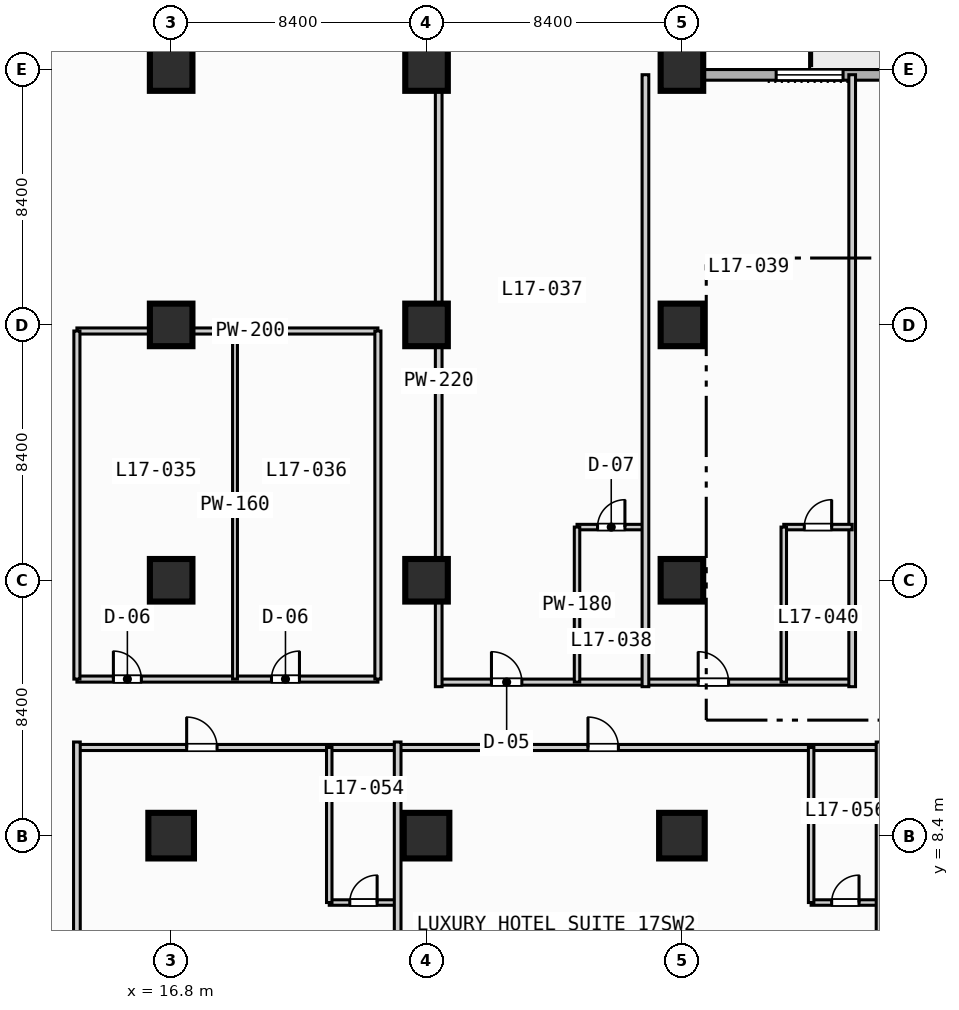
"""IFC4 building model, lengths in metres.
Left out: names, types, materials, properties, quantities, classifications, styles, units other than length and angle.
Written with IfcOpenShell. Run it as: python <this file> out.ifc"""

import sys

from ifc_helpers import new_model, si_unit, direction, frame, frame_2d, origin, origin_2d, place, context, subcontext, project, spatial, rectangle, extrude, element, fill, save


model = new_model("IFC4")
c1 = context("Model", 3, precision=1e-05, world=origin(), true_north=direction((0.0, 1.0)))
c2 = subcontext(c1, "Body", "Model", "MODEL_VIEW")
j1 = project(units=[si_unit("LENGTHUNIT", "METRE"), si_unit("PLANEANGLEUNIT", "RADIAN")], contexts=[c1])
p1 = place(None, origin())
s1 = spatial("IfcSite", under=j1, at=p1, CompositionType="ELEMENT")
p2 = place(p1, origin())
s2 = spatial("IfcBuilding", under=s1, at=p2, CompositionType="ELEMENT")
p3 = place(p2, frame((0.0, 0.0, 73.8)))
s3 = spatial("IfcBuildingStorey", under=s2, at=p3, CompositionType="ELEMENT", Elevation=73.8)
p4 = place(p3, frame((16.8, 8.4, 0.0), z_axis=(0.0, 0.0, 1.0), x_axis=(1.0, 0.0, 0.0)))
e1 = element("IfcColumn", 1, at=p4, inside=s3, PredefinedType="COLUMN", context=c2, shape_type="SweptSolid", body=[
    extrude(rectangle(XDim=1.5, YDim=1.5, at=origin_2d()), origin(), (0.0, 0.0, 1.0), 3.8),
])
for number, where, z_axis, x_axis in (
    (2, (16.8, 16.8, 0.0), (0.0, 0.0, 1.0), (1.0, 0.0, 0.0)),
    (3, (16.8, 25.2, 0.0), (0.0, 0.0, 1.0), (1.0, 0.0, 0.0)),
    (4, (16.8, 33.6, 0.0), (0.0, 0.0, 1.0), (1.0, 0.0, 0.0)),
):
    element("IfcColumn", number, at=place(p3, frame(where, z_axis=z_axis, x_axis=x_axis)), inside=s3, PredefinedType="COLUMN", context=c2, shape_type="SweptSolid", body=[
        extrude(rectangle(XDim=1.4, YDim=1.4, at=origin_2d()), origin(), (0.0, 0.0, 1.0), 3.8),
    ])
p5 = place(p3, frame((25.2, 8.4, 0.0), z_axis=(0.0, 0.0, 1.0), x_axis=(1.0, 0.0, 0.0)))
e5 = element("IfcColumn", 5, at=p5, inside=s3, PredefinedType="COLUMN", context=c2, shape_type="SweptSolid", body=[
    extrude(rectangle(XDim=1.5, YDim=1.5, at=origin_2d()), origin(), (0.0, 0.0, 1.0), 3.8),
])
for number, where, z_axis, x_axis in (
    (6, (25.2, 16.8, 0.0), (0.0, 0.0, 1.0), (1.0, 0.0, 0.0)),
    (7, (25.2, 25.2, 0.0), (0.0, 0.0, 1.0), (1.0, 0.0, 0.0)),
    (8, (25.2, 33.6, 0.0), (0.0, 0.0, 1.0), (1.0, 0.0, 0.0)),
):
    element("IfcColumn", number, at=place(p3, frame(where, z_axis=z_axis, x_axis=x_axis)), inside=s3, PredefinedType="COLUMN", context=c2, shape_type="SweptSolid", body=[
        extrude(rectangle(XDim=1.4, YDim=1.4, at=origin_2d()), origin(), (0.0, 0.0, 1.0), 3.8),
    ])
p6 = place(p3, frame((33.6, 8.4, 0.0), z_axis=(0.0, 0.0, 1.0), x_axis=(1.0, 0.0, 0.0)))
e9 = element("IfcColumn", 9, at=p6, inside=s3, PredefinedType="COLUMN", context=c2, shape_type="SweptSolid", body=[
    extrude(rectangle(XDim=1.5, YDim=1.5, at=origin_2d()), origin(), (0.0, 0.0, 1.0), 3.8),
])
for number, where, z_axis, x_axis in (
    (10, (33.6, 16.8, 0.0), (0.0, 0.0, 1.0), (1.0, 0.0, 0.0)),
    (11, (33.6, 25.2, 0.0), (0.0, 0.0, 1.0), (1.0, 0.0, 0.0)),
    (12, (33.6, 33.6, 0.0), (0.0, 0.0, 1.0), (1.0, 0.0, 0.0)),
):
    element("IfcColumn", number, at=place(p3, frame(where, z_axis=z_axis, x_axis=x_axis)), inside=s3, PredefinedType="COLUMN", context=c2, shape_type="SweptSolid", body=[
        extrude(rectangle(XDim=1.4, YDim=1.4, at=origin_2d()), origin(), (0.0, 0.0, 1.0), 3.8),
    ])
p7 = place(p3, frame((33.425, 89.225, 0.0), z_axis=(0.0, 0.0, 1.0), x_axis=(0.0, -1.0, 0.0)))
e13 = element("IfcWall", 13, at=p7, inside=s3, PredefinedType="STANDARD", context=c2, shape_type="SweptSolid", body=[
    extrude(rectangle(XDim=55.8, YDim=0.35, at=frame_2d((27.9, 0.0))), origin(), (0.0, 0.0, 1.0), 3.55),
])
p8 = place(p7, frame((16.725, 0.0, 0.85)))
e14 = element("IfcOpeningElement", 14, at=p8, cuts=e13, PredefinedType="OPENING", context=c2, shape_type="SweptSolid", body=[
    extrude(rectangle(XDim=2.2, YDim=1.8, at=frame_2d((1.1, 0.9))), frame((0.0, 0.185, 0.0), z_axis=(0.0, -1.0, 0.0), x_axis=(1.0, 0.0, 0.0)), (0.0, 0.0, 1.0), 0.37),
])
p9 = place(p7, frame((8.325, 0.0, 0.85)))
e15 = element("IfcOpeningElement", 15, at=p9, cuts=e13, PredefinedType="OPENING", context=c2, shape_type="SweptSolid", body=[
    extrude(rectangle(XDim=2.2, YDim=1.8, at=frame_2d((1.1, 0.9))), frame((0.0, 0.185, 0.0), z_axis=(0.0, -1.0, 0.0), x_axis=(1.0, 0.0, 0.0)), (0.0, 0.0, 1.0), 0.37),
])
p10 = place(p3, frame((33.425, 33.425, 0.0), z_axis=(0.0, 0.0, 1.0), x_axis=(1.0, 0.0, 0.0)))
e16 = element("IfcWall", 16, at=p10, inside=s3, PredefinedType="STANDARD", context=c2, shape_type="SweptSolid", body=[
    extrude(rectangle(XDim=55.8, YDim=0.35, at=frame_2d((27.9, 0.0))), origin(), (0.0, 0.0, 1.0), 3.55),
])
p11 = place(p10, frame((12.075, 0.0, 0.0)))
e17 = element("IfcOpeningElement", 17, at=p11, cuts=e16, PredefinedType="OPENING", context=c2, shape_type="SweptSolid", body=[
    extrude(rectangle(XDim=1.4, YDim=2.2, at=frame_2d((0.7, 1.1))), frame((0.0, 0.185, 0.0), z_axis=(0.0, -1.0, 0.0), x_axis=(1.0, 0.0, 0.0)), (0.0, 0.0, 1.0), 0.37),
])
p12 = place(p10, frame((3.275, 0.0, 0.85)))
e18 = element("IfcOpeningElement", 18, at=p12, cuts=e16, PredefinedType="OPENING", context=c2, shape_type="SweptSolid", body=[
    extrude(rectangle(XDim=2.2, YDim=1.8, at=frame_2d((1.1, 0.9))), frame((0.0, 0.185, 0.0), z_axis=(0.0, -1.0, 0.0), x_axis=(1.0, 0.0, 0.0)), (0.0, 0.0, 1.0), 0.37),
])
p13 = place(p10, frame((36.875, 0.0, 0.85)))
e19 = element("IfcOpeningElement", 19, at=p13, cuts=e16, PredefinedType="OPENING", context=c2, shape_type="SweptSolid", body=[
    extrude(rectangle(XDim=2.2, YDim=1.8, at=frame_2d((1.1, 0.9))), frame((0.0, 0.185, 0.0), z_axis=(0.0, -1.0, 0.0), x_axis=(1.0, 0.0, 0.0)), (0.0, 0.0, 1.0), 0.37),
])
p14 = place(p10, frame((45.275, 0.0, 0.85)))
e20 = element("IfcOpeningElement", 20, at=p14, cuts=e16, PredefinedType="OPENING", context=c2, shape_type="SweptSolid", body=[
    extrude(rectangle(XDim=2.2, YDim=1.8, at=frame_2d((1.1, 0.9))), frame((0.0, 0.185, 0.0), z_axis=(0.0, -1.0, 0.0), x_axis=(1.0, 0.0, 0.0)), (0.0, 0.0, 1.0), 0.37),
])
p15 = place(p3, frame((13.7, 13.55, 0.0), z_axis=(0.0, 0.0, 1.0), x_axis=(1.0, 0.0, 0.0)))
e21 = element("IfcWall", 21, at=p15, inside=s3, PredefinedType="PARTITIONING", context=c2, shape_type="SweptSolid", body=[
    extrude(rectangle(XDim=9.9, YDim=0.2, at=frame_2d((4.95, 0.0))), origin(), (0.0, 0.0, 1.0), 3.55),
])
p16 = place(p15, frame((1.2, 0.0, 0.0)))
e22 = element("IfcOpeningElement", 22, at=p16, cuts=e21, PredefinedType="OPENING", context=c2, shape_type="SweptSolid", body=[
    extrude(rectangle(XDim=0.92, YDim=2.1, at=frame_2d((0.46, 1.05))), frame((0.0, 0.11, 0.0), z_axis=(0.0, -1.0, 0.0), x_axis=(1.0, 0.0, 0.0)), (0.0, 0.0, 1.0), 0.22),
])
p17 = place(p15, frame((6.4, 0.0, 0.0)))
e23 = element("IfcOpeningElement", 23, at=p17, cuts=e21, PredefinedType="OPENING", context=c2, shape_type="SweptSolid", body=[
    extrude(rectangle(XDim=0.92, YDim=2.1, at=frame_2d((0.46, 1.05))), frame((0.0, 0.11, 0.0), z_axis=(0.0, -1.0, 0.0), x_axis=(1.0, 0.0, 0.0)), (0.0, 0.0, 1.0), 0.22),
])
p18 = place(p3, frame((18.9, 13.55, 0.0), z_axis=(0.0, 0.0, 1.0), x_axis=(0.0, 1.0, 0.0)))
e24 = element("IfcWall", 24, at=p18, inside=s3, PredefinedType="PARTITIONING", context=c2, shape_type="SweptSolid", body=[
    extrude(rectangle(XDim=11.45, YDim=0.16, at=frame_2d((5.725, 0.0))), origin(), (0.0, 0.0, 1.0), 3.55),
])
p19 = place(p3, frame((13.7, 25.0, 0.0), z_axis=(0.0, 0.0, 1.0), x_axis=(1.0, 0.0, 0.0)))
e25 = element("IfcWall", 25, at=p19, inside=s3, PredefinedType="PARTITIONING", context=c2, shape_type="SweptSolid", body=[
    extrude(rectangle(XDim=9.9, YDim=0.2, at=frame_2d((4.95, 0.0))), origin(), (0.0, 0.0, 1.0), 2.8),
])
for number, where, z_axis, x_axis in (
    (26, (13.7, 13.55, 0.0), (0.0, 0.0, 1.0), (0.0, 1.0, 0.0)),
    (27, (23.6, 13.55, 0.0), (0.0, 0.0, 1.0), (0.0, 1.0, 0.0)),
):
    element("IfcWall", number, at=place(p3, frame(where, z_axis=z_axis, x_axis=x_axis)), inside=s3, PredefinedType="PARTITIONING", context=c2, shape_type="SweptSolid", body=[
        extrude(rectangle(XDim=11.45, YDim=0.2, at=frame_2d((5.725, 0.0))), origin(), (0.0, 0.0, 1.0), 3.55),
    ])
p20 = place(p3, frame((25.6, 13.45, 0.0), z_axis=(0.0, 0.0, 1.0), x_axis=(1.0, 0.0, 0.0)))
e28 = element("IfcWall", 28, at=p20, inside=s3, PredefinedType="PARTITIONING", context=c2, shape_type="SweptSolid", body=[
    extrude(rectangle(XDim=13.6, YDim=0.2, at=frame_2d((6.8, 0.0))), origin(), (0.0, 0.0, 1.0), 3.55),
])
p21 = place(p20, frame((1.735, 0.0, 0.0)))
e29 = element("IfcOpeningElement", 29, at=p21, cuts=e28, PredefinedType="OPENING", context=c2, shape_type="SweptSolid", body=[
    extrude(rectangle(XDim=1.0, YDim=2.15, at=frame_2d((0.5, 1.075))), frame((0.0, 0.11, 0.0), z_axis=(0.0, -1.0, 0.0), x_axis=(1.0, 0.0, 0.0)), (0.0, 0.0, 1.0), 0.22),
])
p22 = place(p20, frame((8.535, 0.0, 0.0)))
e30 = element("IfcOpeningElement", 30, at=p22, cuts=e28, PredefinedType="OPENING", context=c2, shape_type="SweptSolid", body=[
    extrude(rectangle(XDim=1.0, YDim=2.15, at=frame_2d((0.5, 1.075))), frame((0.0, 0.11, 0.0), z_axis=(0.0, -1.0, 0.0), x_axis=(1.0, 0.0, 0.0)), (0.0, 0.0, 1.0), 0.22),
])
p23 = place(p3, frame((25.6, 13.3, 0.0), z_axis=(0.0, 0.0, 1.0), x_axis=(0.0, 1.0, 0.0)))
e31 = element("IfcWall", 31, at=p23, inside=s3, PredefinedType="PARTITIONING", context=c2, shape_type="SweptSolid", body=[
    extrude(rectangle(XDim=20.13, YDim=0.22, at=frame_2d((10.065, 0.0))), origin(), (0.0, 0.0, 1.0), 3.55),
])
p24 = place(p3, frame((30.15, 18.55, 0.0), z_axis=(0.0, 0.0, 1.0), x_axis=(1.0, 0.0, 0.0)))
e32 = element("IfcWall", 32, at=p24, inside=s3, PredefinedType="PLUMBINGWALL", context=c2, shape_type="SweptSolid", body=[
    extrude(rectangle(XDim=2.25, YDim=0.18, at=frame_2d((1.125, 0.0))), origin(), (0.0, 0.0, 1.0), 3.55),
])
p25 = place(p24, frame((0.675, 0.0, 0.0)))
e33 = element("IfcOpeningElement", 33, at=p25, cuts=e32, PredefinedType="OPENING", context=c2, shape_type="SweptSolid", body=[
    extrude(rectangle(XDim=0.9, YDim=2.1, at=frame_2d((0.45, 1.05))), frame((0.0, 0.1, 0.0), z_axis=(0.0, -1.0, 0.0), x_axis=(1.0, 0.0, 0.0)), (0.0, 0.0, 1.0), 0.2),
])
p26 = place(p3, frame((30.15, 13.45, 0.0), z_axis=(0.0, 0.0, 1.0), x_axis=(0.0, 1.0, 0.0)))
e34 = element("IfcWall", 34, at=p26, inside=s3, PredefinedType="PLUMBINGWALL", context=c2, shape_type="SweptSolid", body=[
    extrude(rectangle(XDim=5.1, YDim=0.18, at=frame_2d((2.55, 0.0))), origin(), (0.0, 0.0, 1.0), 3.55),
])
for number, where, z_axis, x_axis in (
    (35, (32.4, 13.3, 0.0), (0.0, 0.0, 1.0), (0.0, 1.0, 0.0)),
    (36, (39.2, 13.3, 0.0), (0.0, 0.0, 1.0), (0.0, 1.0, 0.0)),
):
    element("IfcWall", number, at=place(p3, frame(where, z_axis=z_axis, x_axis=x_axis)), inside=s3, PredefinedType="PARTITIONING", context=c2, shape_type="SweptSolid", body=[
        extrude(rectangle(XDim=20.13, YDim=0.22, at=frame_2d((10.065, 0.0))), origin(), (0.0, 0.0, 1.0), 3.55),
    ])
p27 = place(p3, frame((36.95, 18.55, 0.0), z_axis=(0.0, 0.0, 1.0), x_axis=(1.0, 0.0, 0.0)))
e37 = element("IfcWall", 37, at=p27, inside=s3, PredefinedType="PLUMBINGWALL", context=c2, shape_type="SweptSolid", body=[
    extrude(rectangle(XDim=2.25, YDim=0.18, at=frame_2d((1.125, 0.0))), origin(), (0.0, 0.0, 1.0), 3.55),
])
p28 = place(p27, frame((0.675, 0.0, 0.0)))
e38 = element("IfcOpeningElement", 38, at=p28, cuts=e37, PredefinedType="OPENING", context=c2, shape_type="SweptSolid", body=[
    extrude(rectangle(XDim=0.9, YDim=2.1, at=frame_2d((0.45, 1.05))), frame((0.0, 0.1, 0.0), z_axis=(0.0, -1.0, 0.0), x_axis=(1.0, 0.0, 0.0)), (0.0, 0.0, 1.0), 0.2),
])
p29 = place(p3, frame((36.95, 13.45, 0.0), z_axis=(0.0, 0.0, 1.0), x_axis=(0.0, 1.0, 0.0)))
e39 = element("IfcWall", 39, at=p29, inside=s3, PredefinedType="PLUMBINGWALL", context=c2, shape_type="SweptSolid", body=[
    extrude(rectangle(XDim=5.1, YDim=0.18, at=frame_2d((2.55, 0.0))), origin(), (0.0, 0.0, 1.0), 3.55),
])
p30 = place(p3, frame((13.7, 11.3, 0.0), z_axis=(0.0, 0.0, 1.0), x_axis=(1.0, 0.0, 0.0)))
e40 = element("IfcWall", 40, at=p30, inside=s3, PredefinedType="PARTITIONING", context=c2, shape_type="SweptSolid", body=[
    extrude(rectangle(XDim=50.1, YDim=0.2, at=frame_2d((25.05, 0.0))), origin(), (0.0, 0.0, 1.0), 3.55),
])
p31 = place(p30, frame((3.61, 0.0, 0.0)))
e41 = element("IfcOpeningElement", 41, at=p31, cuts=e40, PredefinedType="OPENING", context=c2, shape_type="SweptSolid", body=[
    extrude(rectangle(XDim=1.0, YDim=2.15, at=frame_2d((0.5, 1.075))), frame((0.0, 0.11, 0.0), z_axis=(0.0, -1.0, 0.0), x_axis=(1.0, 0.0, 0.0)), (0.0, 0.0, 1.0), 0.22),
])
p32 = place(p30, frame((16.81, 0.0, 0.0)))
e42 = element("IfcOpeningElement", 42, at=p32, cuts=e40, PredefinedType="OPENING", context=c2, shape_type="SweptSolid", body=[
    extrude(rectangle(XDim=1.0, YDim=2.15, at=frame_2d((0.5, 1.075))), frame((0.0, 0.11, 0.0), z_axis=(0.0, -1.0, 0.0), x_axis=(1.0, 0.0, 0.0)), (0.0, 0.0, 1.0), 0.22),
])
p33 = place(p30, frame((31.935, 0.0, 0.0)))
e43 = element("IfcOpeningElement", 43, at=p33, cuts=e40, PredefinedType="OPENING", context=c2, shape_type="SweptSolid", body=[
    extrude(rectangle(XDim=1.0, YDim=2.15, at=frame_2d((0.5, 1.075))), frame((0.0, 0.11, 0.0), z_axis=(0.0, -1.0, 0.0), x_axis=(1.0, 0.0, 0.0)), (0.0, 0.0, 1.0), 0.22),
])
p34 = place(p30, frame((43.785, 0.0, 0.0)))
e44 = element("IfcOpeningElement", 44, at=p34, cuts=e40, PredefinedType="OPENING", context=c2, shape_type="SweptSolid", body=[
    extrude(rectangle(XDim=1.0, YDim=2.15, at=frame_2d((0.5, 1.075))), frame((0.0, 0.11, 0.0), z_axis=(0.0, -1.0, 0.0), x_axis=(1.0, 0.0, 0.0)), (0.0, 0.0, 1.0), 0.22),
])
p35 = place(p3, frame((13.7, 0.2, 0.0), z_axis=(0.0, 0.0, 1.0), x_axis=(0.0, 1.0, 0.0)))
e45 = element("IfcWall", 45, at=p35, inside=s3, PredefinedType="PARTITIONING", context=c2, shape_type="SweptSolid", body=[
    extrude(rectangle(XDim=11.28, YDim=0.22, at=frame_2d((5.64, 0.0))), origin(), (0.0, 0.0, 1.0), 3.55),
])
p36 = place(p3, frame((22.0, 6.2, 0.0), z_axis=(0.0, 0.0, 1.0), x_axis=(1.0, 0.0, 0.0)))
e46 = element("IfcWall", 46, at=p36, inside=s3, PredefinedType="PLUMBINGWALL", context=c2, shape_type="SweptSolid", body=[
    extrude(rectangle(XDim=2.25, YDim=0.18, at=frame_2d((1.125, 0.0))), origin(), (0.0, 0.0, 1.0), 3.55),
])
p37 = place(p36, frame((0.675, 0.0, 0.0)))
e47 = element("IfcOpeningElement", 47, at=p37, cuts=e46, PredefinedType="OPENING", context=c2, shape_type="SweptSolid", body=[
    extrude(rectangle(XDim=0.9, YDim=2.1, at=frame_2d((0.45, 1.05))), frame((0.0, 0.1, 0.0), z_axis=(0.0, -1.0, 0.0), x_axis=(1.0, 0.0, 0.0)), (0.0, 0.0, 1.0), 0.2),
])
p38 = place(p3, frame((22.0, 6.2, 0.0), z_axis=(0.0, 0.0, 1.0), x_axis=(0.0, 1.0, 0.0)))
e48 = element("IfcWall", 48, at=p38, inside=s3, PredefinedType="PLUMBINGWALL", context=c2, shape_type="SweptSolid", body=[
    extrude(rectangle(XDim=5.1, YDim=0.18, at=frame_2d((2.55, 0.0))), origin(), (0.0, 0.0, 1.0), 3.55),
])
p39 = place(p3, frame((24.25, 0.2, 0.0), z_axis=(0.0, 0.0, 1.0), x_axis=(0.0, 1.0, 0.0)))
e49 = element("IfcWall", 49, at=p39, inside=s3, PredefinedType="PARTITIONING", context=c2, shape_type="SweptSolid", body=[
    extrude(rectangle(XDim=11.28, YDim=0.22, at=frame_2d((5.64, 0.0))), origin(), (0.0, 0.0, 1.0), 3.55),
])
p40 = place(p3, frame((37.85, 6.2, 0.0), z_axis=(0.0, 0.0, 1.0), x_axis=(1.0, 0.0, 0.0)))
e50 = element("IfcWall", 50, at=p40, inside=s3, PredefinedType="PLUMBINGWALL", context=c2, shape_type="SweptSolid", body=[
    extrude(rectangle(XDim=2.25, YDim=0.18, at=frame_2d((1.125, 0.0))), origin(), (0.0, 0.0, 1.0), 3.55),
])
p41 = place(p40, frame((0.675, 0.0, 0.0)))
e51 = element("IfcOpeningElement", 51, at=p41, cuts=e50, PredefinedType="OPENING", context=c2, shape_type="SweptSolid", body=[
    extrude(rectangle(XDim=0.9, YDim=2.1, at=frame_2d((0.45, 1.05))), frame((0.0, 0.1, 0.0), z_axis=(0.0, -1.0, 0.0), x_axis=(1.0, 0.0, 0.0)), (0.0, 0.0, 1.0), 0.2),
])
p42 = place(p3, frame((37.85, 6.2, 0.0), z_axis=(0.0, 0.0, 1.0), x_axis=(0.0, 1.0, 0.0)))
e52 = element("IfcWall", 52, at=p42, inside=s3, PredefinedType="PLUMBINGWALL", context=c2, shape_type="SweptSolid", body=[
    extrude(rectangle(XDim=5.1, YDim=0.18, at=frame_2d((2.55, 0.0))), origin(), (0.0, 0.0, 1.0), 3.55),
])
p43 = place(p3, frame((40.1, 0.2, 0.0), z_axis=(0.0, 0.0, 1.0), x_axis=(0.0, 1.0, 0.0)))
e53 = element("IfcWall", 53, at=p43, inside=s3, PredefinedType="PARTITIONING", context=c2, shape_type="SweptSolid", body=[
    extrude(rectangle(XDim=11.28, YDim=0.22, at=frame_2d((5.64, 0.0))), origin(), (0.0, 0.0, 1.0), 3.55),
])
p44 = place(p12, origin())
e54 = element("IfcWindow", 54, at=p44, inside=s3, PartitioningType="SINGLE_PANEL", PredefinedType="WINDOW", context=c2, shape_type="SweptSolid", body=[
    extrude(rectangle(XDim=2.2, YDim=1.8, at=frame_2d((1.1, 0.9))), frame((0.0, 0.03, 0.0), z_axis=(0.0, -1.0, 0.0), x_axis=(1.0, 0.0, 0.0)), (0.0, 0.0, 1.0), 0.06),
])
fill(e18, e54)
p45 = place(p16, origin())
e55 = element("IfcDoor", 55, at=p45, inside=s3, OperationType="SINGLE_SWING_LEFT", PredefinedType="DOOR", context=c2, shape_type="SweptSolid", body=[
    extrude(rectangle(XDim=0.92, YDim=2.1, at=frame_2d((0.46, 1.05))), frame((0.0, 0.025, 0.0), z_axis=(0.0, -1.0, 0.0), x_axis=(1.0, 0.0, 0.0)), (0.0, 0.0, 1.0), 0.05),
])
fill(e22, e55)
p46 = place(p17, origin())
e56 = element("IfcDoor", 56, at=p46, inside=s3, OperationType="SINGLE_SWING_RIGHT", PredefinedType="DOOR", context=c2, shape_type="SweptSolid", body=[
    extrude(rectangle(XDim=0.92, YDim=2.1, at=frame_2d((0.46, 1.05))), frame((0.0, 0.025, 0.0), z_axis=(0.0, -1.0, 0.0), x_axis=(1.0, 0.0, 0.0)), (0.0, 0.0, 1.0), 0.05),
])
fill(e23, e56)
p47 = place(p21, origin())
e57 = element("IfcDoor", 57, at=p47, inside=s3, OperationType="SINGLE_SWING_LEFT", PredefinedType="DOOR", context=c2, shape_type="SweptSolid", body=[
    extrude(rectangle(XDim=1.0, YDim=2.15, at=frame_2d((0.5, 1.075))), frame((0.0, 0.025, 0.0), z_axis=(0.0, -1.0, 0.0), x_axis=(1.0, 0.0, 0.0)), (0.0, 0.0, 1.0), 0.05),
])
fill(e29, e57)
p48 = place(p22, origin())
e58 = element("IfcDoor", 58, at=p48, inside=s3, OperationType="SINGLE_SWING_LEFT", PredefinedType="DOOR", context=c2, shape_type="SweptSolid", body=[
    extrude(rectangle(XDim=1.0, YDim=2.15, at=frame_2d((0.5, 1.075))), frame((0.0, 0.025, 0.0), z_axis=(0.0, -1.0, 0.0), x_axis=(1.0, 0.0, 0.0)), (0.0, 0.0, 1.0), 0.05),
])
fill(e30, e58)
p49 = place(p25, origin())
e59 = element("IfcDoor", 59, at=p49, inside=s3, OperationType="SINGLE_SWING_RIGHT", PredefinedType="DOOR", context=c2, shape_type="SweptSolid", body=[
    extrude(rectangle(XDim=0.9, YDim=2.1, at=frame_2d((0.45, 1.05))), frame((0.0, 0.025, 0.0), z_axis=(0.0, -1.0, 0.0), x_axis=(1.0, 0.0, 0.0)), (0.0, 0.0, 1.0), 0.05),
])
fill(e33, e59)
p50 = place(p28, origin())
e60 = element("IfcDoor", 60, at=p50, inside=s3, OperationType="SINGLE_SWING_RIGHT", PredefinedType="DOOR", context=c2, shape_type="SweptSolid", body=[
    extrude(rectangle(XDim=0.9, YDim=2.1, at=frame_2d((0.45, 1.05))), frame((0.0, 0.025, 0.0), z_axis=(0.0, -1.0, 0.0), x_axis=(1.0, 0.0, 0.0)), (0.0, 0.0, 1.0), 0.05),
])
fill(e38, e60)
p51 = place(p31, origin())
e61 = element("IfcDoor", 61, at=p51, inside=s3, OperationType="SINGLE_SWING_LEFT", PredefinedType="DOOR", context=c2, shape_type="SweptSolid", body=[
    extrude(rectangle(XDim=1.0, YDim=2.15, at=frame_2d((0.5, 1.075))), frame((0.0, 0.025, 0.0), z_axis=(0.0, -1.0, 0.0), x_axis=(1.0, 0.0, 0.0)), (0.0, 0.0, 1.0), 0.05),
])
fill(e41, e61)
p52 = place(p32, origin())
e62 = element("IfcDoor", 62, at=p52, inside=s3, OperationType="SINGLE_SWING_LEFT", PredefinedType="DOOR", context=c2, shape_type="SweptSolid", body=[
    extrude(rectangle(XDim=1.0, YDim=2.15, at=frame_2d((0.5, 1.075))), frame((0.0, 0.025, 0.0), z_axis=(0.0, -1.0, 0.0), x_axis=(1.0, 0.0, 0.0)), (0.0, 0.0, 1.0), 0.05),
])
fill(e42, e62)
p53 = place(p37, origin())
e63 = element("IfcDoor", 63, at=p53, inside=s3, OperationType="SINGLE_SWING_RIGHT", PredefinedType="DOOR", context=c2, shape_type="SweptSolid", body=[
    extrude(rectangle(XDim=0.9, YDim=2.1, at=frame_2d((0.45, 1.05))), frame((0.0, 0.025, 0.0), z_axis=(0.0, -1.0, 0.0), x_axis=(1.0, 0.0, 0.0)), (0.0, 0.0, 1.0), 0.05),
])
fill(e47, e63)
p54 = place(p41, origin())
e64 = element("IfcDoor", 64, at=p54, inside=s3, OperationType="SINGLE_SWING_RIGHT", PredefinedType="DOOR", context=c2, shape_type="SweptSolid", body=[
    extrude(rectangle(XDim=0.9, YDim=2.1, at=frame_2d((0.45, 1.05))), frame((0.0, 0.025, 0.0), z_axis=(0.0, -1.0, 0.0), x_axis=(1.0, 0.0, 0.0)), (0.0, 0.0, 1.0), 0.05),
])
fill(e51, e64)
save(model, sys.argv[1])
